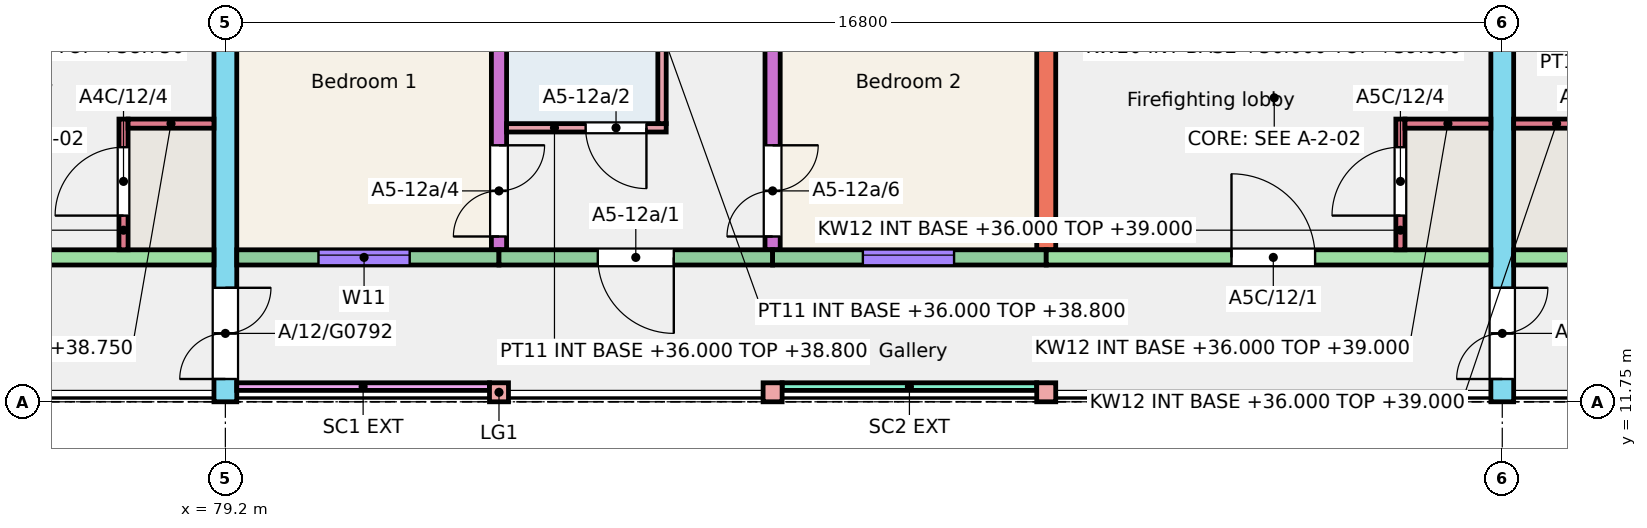
"""IFC4 building model, lengths in metres.
Left out: names, types, materials, properties, quantities, classifications, styles, units other than length and angle.
Written with IfcOpenShell. Run it as: python <this file> out.ifc"""

import sys

from ifc_helpers import new_model, si_unit, direction, frame, frame_2d, origin, origin_2d, place, context, subcontext, project, spatial, rectangle, extrude, element, fill, save


model = new_model("IFC4")
c1 = context("Model", 3, precision=1e-05, world=origin(), true_north=direction((0.0, 1.0)))
c2 = subcontext(c1, "Body", "Model", "MODEL_VIEW")
j1 = project(units=[si_unit("LENGTHUNIT", "METRE"), si_unit("PLANEANGLEUNIT", "RADIAN")], contexts=[c1])
p1 = place(None, origin())
s1 = spatial("IfcSite", under=j1, at=p1, CompositionType="ELEMENT")
p2 = place(p1, origin())
s2 = spatial("IfcBuilding", under=s1, at=p2, CompositionType="ELEMENT")
p3 = place(p2, frame((0.0, 0.0, 36.0)))
s3 = spatial("IfcBuildingStorey", under=s2, at=p3, CompositionType="ELEMENT", Elevation=36.0)
p4 = place(p3, frame((79.2, 11.75, 0.0), z_axis=(0.0, 0.0, 1.0), x_axis=(0.0, 1.0, 0.0)))
e1 = element("IfcWall", 1, at=p4, inside=s3, PredefinedType="SHEAR", context=c2, shape_type="SweptSolid", body=[
    extrude(rectangle(XDim=11.0, YDim=0.3, at=frame_2d((5.5, 0.0))), origin(), (0.0, 0.0, 1.0), 3.0),
])
p5 = place(p4, frame((0.3, 0.0, 0.0)))
e2 = element("IfcOpeningElement", 2, at=p5, cuts=e1, PredefinedType="OPENING", context=c2, shape_type="SweptSolid", body=[
    extrude(rectangle(XDim=1.2, YDim=2.1, at=frame_2d((0.6, 1.05))), frame((0.0, 0.16, 0.0), z_axis=(0.0, -1.0, 0.0), x_axis=(1.0, 0.0, 0.0)), (0.0, 0.0, 1.0), 0.32),
])
p6 = place(p3, frame((82.8, 13.75, 0.0), z_axis=(0.0, 0.0, 1.0), x_axis=(0.0, 1.0, 0.0)))
e3 = element("IfcWall", 3, at=p6, inside=s3, PredefinedType="SHEAR", context=c2, shape_type="SweptSolid", body=[
    extrude(rectangle(XDim=9.0, YDim=0.2, at=frame_2d((4.5, 0.0))), origin(), (0.0, 0.0, 1.0), 3.0),
])
p7 = place(p6, frame((0.175, 0.0, 0.0)))
e4 = element("IfcOpeningElement", 4, at=p7, cuts=e3, PredefinedType="OPENING", context=c2, shape_type="SweptSolid", body=[
    extrude(rectangle(XDim=1.2, YDim=2.1, at=frame_2d((0.6, 1.05))), frame((0.0, 0.11, 0.0), z_axis=(0.0, -1.0, 0.0), x_axis=(1.0, 0.0, 0.0)), (0.0, 0.0, 1.0), 0.22),
])
p8 = place(p6, frame((6.4, 0.0, 0.0)))
e5 = element("IfcOpeningElement", 5, at=p8, cuts=e3, PredefinedType="OPENING", context=c2, shape_type="SweptSolid", body=[
    extrude(rectangle(XDim=1.2, YDim=2.1, at=frame_2d((0.6, 1.05))), frame((0.0, 0.11, 0.0), z_axis=(0.0, -1.0, 0.0), x_axis=(1.0, 0.0, 0.0)), (0.0, 0.0, 1.0), 0.22),
])
p9 = place(p3, frame((86.4, 13.75, 0.0), z_axis=(0.0, 0.0, 1.0), x_axis=(0.0, 1.0, 0.0)))
e6 = element("IfcWall", 6, at=p9, inside=s3, PredefinedType="SHEAR", context=c2, shape_type="SweptSolid", body=[
    extrude(rectangle(XDim=9.0, YDim=0.2, at=frame_2d((4.5, 0.0))), origin(), (0.0, 0.0, 1.0), 3.0),
])
p10 = place(p9, frame((0.175, 0.0, 0.0)))
e7 = element("IfcOpeningElement", 7, at=p10, cuts=e6, PredefinedType="OPENING", context=c2, shape_type="SweptSolid", body=[
    extrude(rectangle(XDim=1.2, YDim=2.1, at=frame_2d((0.6, 1.05))), frame((0.0, 0.11, 0.0), z_axis=(0.0, -1.0, 0.0), x_axis=(1.0, 0.0, 0.0)), (0.0, 0.0, 1.0), 0.22),
])
p11 = place(p9, frame((6.4, 0.0, 0.0)))
e8 = element("IfcOpeningElement", 8, at=p11, cuts=e6, PredefinedType="OPENING", context=c2, shape_type="SweptSolid", body=[
    extrude(rectangle(XDim=1.2, YDim=2.1, at=frame_2d((0.6, 1.05))), frame((0.0, 0.11, 0.0), z_axis=(0.0, -1.0, 0.0), x_axis=(1.0, 0.0, 0.0)), (0.0, 0.0, 1.0), 0.22),
])
p12 = place(p3, frame((90.0, 13.75, 0.0), z_axis=(0.0, 0.0, 1.0), x_axis=(0.0, 1.0, 0.0)))
e9 = element("IfcWall", 9, at=p12, inside=s3, PredefinedType="SHEAR", context=c2, shape_type="SweptSolid", body=[
    extrude(rectangle(XDim=9.0, YDim=0.25, at=frame_2d((4.5, 0.0))), origin(), (0.0, 0.0, 1.0), 3.0),
])
p13 = place(p3, frame((96.0, 11.75, 0.0), z_axis=(0.0, 0.0, 1.0), x_axis=(0.0, 1.0, 0.0)))
e10 = element("IfcWall", 10, at=p13, inside=s3, PredefinedType="SHEAR", context=c2, shape_type="SweptSolid", body=[
    extrude(rectangle(XDim=11.0, YDim=0.3, at=frame_2d((5.5, 0.0))), origin(), (0.0, 0.0, 1.0), 3.0),
])
p14 = place(p13, frame((0.3, 0.0, 0.0)))
e11 = element("IfcOpeningElement", 11, at=p14, cuts=e10, PredefinedType="OPENING", context=c2, shape_type="SweptSolid", body=[
    extrude(rectangle(XDim=1.2, YDim=2.1, at=frame_2d((0.6, 1.05))), frame((0.0, 0.16, 0.0), z_axis=(0.0, -1.0, 0.0), x_axis=(1.0, 0.0, 0.0)), (0.0, 0.0, 1.0), 0.32),
])
p15 = place(p3, frame((73.2, 13.65, 0.0), z_axis=(0.0, 0.0, 1.0), x_axis=(1.0, 0.0, 0.0)))
e12 = element("IfcWall", 12, at=p15, inside=s3, PredefinedType="SHEAR", context=c2, shape_type="SweptSolid", body=[
    extrude(rectangle(XDim=5.85, YDim=0.2, at=frame_2d((2.925, 0.0))), origin(), (0.0, 0.0, 1.0), 2.75),
])
p16 = place(p15, frame((2.438, 0.0, 0.0)))
e13 = element("IfcOpeningElement", 13, at=p16, cuts=e12, PredefinedType="OPENING", context=c2, shape_type="SweptSolid", body=[
    extrude(rectangle(XDim=1.1, YDim=2.1, at=frame_2d((0.55, 1.05))), frame((0.0, 0.11, 0.0), z_axis=(0.0, -1.0, 0.0), x_axis=(1.0, 0.0, 0.0)), (0.0, 0.0, 1.0), 0.22),
])
p17 = place(p3, frame((77.86, 13.75, 0.0), z_axis=(0.0, 0.0, 1.0), x_axis=(0.0, 1.0, 0.0)))
e14 = element("IfcWall", 14, at=p17, inside=s3, PredefinedType="SHEAR", context=c2, shape_type="SweptSolid", body=[
    extrude(rectangle(XDim=1.72, YDim=0.12, at=frame_2d((0.86, 0.0))), origin(), (0.0, 0.0, 1.0), 2.75),
])
p18 = place(p17, frame((0.45, 0.0, 0.0)))
e15 = element("IfcOpeningElement", 15, at=p18, cuts=e14, PredefinedType="OPENING", context=c2, shape_type="SweptSolid", body=[
    extrude(rectangle(XDim=0.9, YDim=2.1, at=frame_2d((0.45, 1.05))), frame((0.0, 0.07, 0.0), z_axis=(0.0, -1.0, 0.0), x_axis=(1.0, 0.0, 0.0)), (0.0, 0.0, 1.0), 0.14),
])
p19 = place(p3, frame((77.92, 15.41, 0.0), z_axis=(0.0, 0.0, 1.0), x_axis=(1.0, 0.0, 0.0)))
e16 = element("IfcWall", 16, at=p19, inside=s3, PredefinedType="SHEAR", context=c2, shape_type="SweptSolid", body=[
    extrude(rectangle(XDim=1.13, YDim=0.12, at=frame_2d((0.565, 0.0))), origin(), (0.0, 0.0, 1.0), 2.75),
])
p20 = place(p3, frame((79.35, 13.65, 0.0), z_axis=(0.0, 0.0, 1.0), x_axis=(1.0, 0.0, 0.0)))
e17 = element("IfcWall", 17, at=p20, inside=s3, PredefinedType="SOLIDWALL", context=c2, shape_type="SweptSolid", body=[
    extrude(rectangle(XDim=3.45, YDim=0.2, at=frame_2d((1.725, 0.0))), origin(), (0.0, 0.0, 1.0), 3.0),
])
p21 = place(p20, frame((1.075, 0.0, 0.8)))
e18 = element("IfcOpeningElement", 18, at=p21, cuts=e17, PredefinedType="OPENING", context=c2, shape_type="SweptSolid", body=[
    extrude(rectangle(XDim=1.2, YDim=1.6, at=frame_2d((0.6, 0.8))), frame((0.0, 0.11, 0.0), z_axis=(0.0, -1.0, 0.0), x_axis=(1.0, 0.0, 0.0)), (0.0, 0.0, 1.0), 0.22),
])
p22 = place(p3, frame((82.8, 13.65, 0.0), z_axis=(0.0, 0.0, 1.0), x_axis=(1.0, 0.0, 0.0)))
e19 = element("IfcWall", 19, at=p22, inside=s3, PredefinedType="SOLIDWALL", context=c2, shape_type="SweptSolid", body=[
    extrude(rectangle(XDim=3.6, YDim=0.2, at=frame_2d((1.8, 0.0))), origin(), (0.0, 0.0, 1.0), 3.0),
])
p23 = place(p22, frame((1.3, 0.0, 0.0)))
e20 = element("IfcOpeningElement", 20, at=p23, cuts=e19, PredefinedType="OPENING", context=c2, shape_type="SweptSolid", body=[
    extrude(rectangle(XDim=1.0, YDim=2.1, at=frame_2d((0.5, 1.05))), frame((0.0, 0.11, 0.0), z_axis=(0.0, -1.0, 0.0), x_axis=(1.0, 0.0, 0.0)), (0.0, 0.0, 1.0), 0.22),
])
p24 = place(p3, frame((86.4, 13.65, 0.0), z_axis=(0.0, 0.0, 1.0), x_axis=(1.0, 0.0, 0.0)))
e21 = element("IfcWall", 21, at=p24, inside=s3, PredefinedType="SOLIDWALL", context=c2, shape_type="SweptSolid", body=[
    extrude(rectangle(XDim=3.6, YDim=0.2, at=frame_2d((1.8, 0.0))), origin(), (0.0, 0.0, 1.0), 3.0),
])
p25 = place(p24, frame((1.188, 0.0, 0.8)))
e22 = element("IfcOpeningElement", 22, at=p25, cuts=e21, PredefinedType="OPENING", context=c2, shape_type="SweptSolid", body=[
    extrude(rectangle(XDim=1.2, YDim=1.6, at=frame_2d((0.6, 0.8))), frame((0.0, 0.11, 0.0), z_axis=(0.0, -1.0, 0.0), x_axis=(1.0, 0.0, 0.0)), (0.0, 0.0, 1.0), 0.22),
])
p26 = place(p3, frame((90.0, 13.65, 0.0), z_axis=(0.0, 0.0, 1.0), x_axis=(1.0, 0.0, 0.0)))
e23 = element("IfcWall", 23, at=p26, inside=s3, PredefinedType="SHEAR", context=c2, shape_type="SweptSolid", body=[
    extrude(rectangle(XDim=5.85, YDim=0.2, at=frame_2d((2.925, 0.0))), origin(), (0.0, 0.0, 1.0), 3.0),
])
p27 = place(p26, frame((2.438, 0.0, 0.0)))
e24 = element("IfcOpeningElement", 24, at=p27, cuts=e23, PredefinedType="OPENING", context=c2, shape_type="SweptSolid", body=[
    extrude(rectangle(XDim=1.1, YDim=2.1, at=frame_2d((0.55, 1.05))), frame((0.0, 0.11, 0.0), z_axis=(0.0, -1.0, 0.0), x_axis=(1.0, 0.0, 0.0)), (0.0, 0.0, 1.0), 0.22),
])
p28 = place(p3, frame((94.66, 13.75, 0.0), z_axis=(0.0, 0.0, 1.0), x_axis=(0.0, 1.0, 0.0)))
e25 = element("IfcWall", 25, at=p28, inside=s3, PredefinedType="SHEAR", context=c2, shape_type="SweptSolid", body=[
    extrude(rectangle(XDim=1.72, YDim=0.12, at=frame_2d((0.86, 0.0))), origin(), (0.0, 0.0, 1.0), 3.0),
])
p29 = place(p28, frame((0.45, 0.0, 0.0)))
e26 = element("IfcOpeningElement", 26, at=p29, cuts=e25, PredefinedType="OPENING", context=c2, shape_type="SweptSolid", body=[
    extrude(rectangle(XDim=0.9, YDim=2.1, at=frame_2d((0.45, 1.05))), frame((0.0, 0.07, 0.0), z_axis=(0.0, -1.0, 0.0), x_axis=(1.0, 0.0, 0.0)), (0.0, 0.0, 1.0), 0.14),
])
p30 = place(p3, frame((94.72, 15.41, 0.0), z_axis=(0.0, 0.0, 1.0), x_axis=(1.0, 0.0, 0.0)))
e27 = element("IfcWall", 27, at=p30, inside=s3, PredefinedType="SHEAR", context=c2, shape_type="SweptSolid", body=[
    extrude(rectangle(XDim=1.13, YDim=0.12, at=frame_2d((0.565, 0.0))), origin(), (0.0, 0.0, 1.0), 3.0),
])
p31 = place(p3, frame((96.15, 13.65, 0.0), z_axis=(0.0, 0.0, 1.0), x_axis=(1.0, 0.0, 0.0)))
e28 = element("IfcWall", 28, at=p31, inside=s3, PredefinedType="SHEAR", context=c2, shape_type="SweptSolid", body=[
    extrude(rectangle(XDim=5.85, YDim=0.2, at=frame_2d((2.925, 0.0))), origin(), (0.0, 0.0, 1.0), 3.0),
])
p32 = place(p31, frame((2.312, 0.0, 0.0)))
e29 = element("IfcOpeningElement", 29, at=p32, cuts=e28, PredefinedType="OPENING", context=c2, shape_type="SweptSolid", body=[
    extrude(rectangle(XDim=1.1, YDim=2.1, at=frame_2d((0.55, 1.05))), frame((0.0, 0.11, 0.0), z_axis=(0.0, -1.0, 0.0), x_axis=(1.0, 0.0, 0.0)), (0.0, 0.0, 1.0), 0.22),
])
p33 = place(p3, frame((96.15, 15.41, 0.0), z_axis=(0.0, 0.0, 1.0), x_axis=(1.0, 0.0, 0.0)))
e30 = element("IfcWall", 30, at=p33, inside=s3, PredefinedType="SHEAR", context=c2, shape_type="SweptSolid", body=[
    extrude(rectangle(XDim=1.13, YDim=0.12, at=frame_2d((0.565, 0.0))), origin(), (0.0, 0.0, 1.0), 3.0),
])
for number, where, z_axis, x_axis in (
    (31, (82.8, 11.875, 0.0), (0.0, 0.0, 1.0), (1.0, 0.0, 0.0)),
    (32, (86.4, 11.875, 0.0), (0.0, 0.0, 1.0), (1.0, 0.0, 0.0)),
    (33, (90.0, 11.875, 0.0), (0.0, 0.0, 1.0), (1.0, 0.0, 0.0)),
):
    element("IfcColumn", number, at=place(p3, frame(where, z_axis=z_axis, x_axis=x_axis)), inside=s3, PredefinedType="COLUMN", context=c2, shape_type="SweptSolid", body=[
        extrude(rectangle(XDim=0.25, YDim=0.25, at=origin_2d()), origin(), (0.0, 0.0, 1.0), 3.0),
    ])
p34 = place(p3, frame((79.35, 11.95, 0.0), z_axis=(0.0, 0.0, 1.0), x_axis=(1.0, 0.0, 0.0)))
e34 = element("IfcWall", 34, at=p34, inside=s3, PredefinedType="SOLIDWALL", context=c2, shape_type="SweptSolid", body=[
    extrude(rectangle(XDim=3.325, YDim=0.1, at=frame_2d((1.663, 0.0))), origin(), (0.0, 0.0, 1.0), 2.45),
])
p35 = place(p3, frame((86.525, 11.95, 0.0), z_axis=(0.0, 0.0, 1.0), x_axis=(1.0, 0.0, 0.0)))
e35 = element("IfcWall", 35, at=p35, inside=s3, PredefinedType="SOLIDWALL", context=c2, shape_type="SweptSolid", body=[
    extrude(rectangle(XDim=3.35, YDim=0.1, at=frame_2d((1.675, 0.0))), origin(), (0.0, 0.0, 1.0), 2.45),
])
p36 = place(p3, frame((82.9, 15.355, 0.0), z_axis=(0.0, 0.0, 1.0), x_axis=(1.0, 0.0, 0.0)))
e36 = element("IfcWall", 36, at=p36, inside=s3, PredefinedType="PARTITIONING", context=c2, shape_type="SweptSolid", body=[
    extrude(rectangle(XDim=2.1, YDim=0.11, at=frame_2d((1.05, 0.0))), origin(), (0.0, 0.0, 1.0), 2.8),
])
p37 = place(p36, frame((1.04, 0.0, 0.0)))
e37 = element("IfcOpeningElement", 37, at=p37, cuts=e36, PredefinedType="OPENING", context=c2, shape_type="SweptSolid", body=[
    extrude(rectangle(XDim=0.8, YDim=2.1, at=frame_2d((0.4, 1.05))), frame((0.0, 0.065, 0.0), z_axis=(0.0, -1.0, 0.0), x_axis=(1.0, 0.0, 0.0)), (0.0, 0.0, 1.0), 0.13),
])
p38 = place(p3, frame((84.945, 15.41, 0.0), z_axis=(0.0, 0.0, 1.0), x_axis=(0.0, 1.0, 0.0)))
e38 = element("IfcWall", 38, at=p38, inside=s3, PredefinedType="PARTITIONING", context=c2, shape_type="SweptSolid", body=[
    extrude(rectangle(XDim=2.4, YDim=0.11, at=frame_2d((1.2, 0.0))), origin(), (0.0, 0.0, 1.0), 2.8),
])
p39 = place(p21, origin())
e39 = element("IfcWindow", 39, at=p39, inside=s3, PartitioningType="SINGLE_PANEL", PredefinedType="WINDOW", context=c2, shape_type="SweptSolid", body=[
    extrude(rectangle(XDim=1.2, YDim=1.6, at=frame_2d((0.6, 0.8))), frame((0.0, 0.06, 0.0), z_axis=(0.0, -1.0, 0.0), x_axis=(1.0, 0.0, 0.0)), (0.0, 0.0, 1.0), 0.06),
])
fill(e18, e39)
p40 = place(p25, origin())
e40 = element("IfcWindow", 40, at=p40, inside=s3, PartitioningType="SINGLE_PANEL", PredefinedType="WINDOW", context=c2, shape_type="SweptSolid", body=[
    extrude(rectangle(XDim=1.2, YDim=1.6, at=frame_2d((0.6, 0.8))), frame((0.0, 0.06, 0.0), z_axis=(0.0, -1.0, 0.0), x_axis=(1.0, 0.0, 0.0)), (0.0, 0.0, 1.0), 0.06),
])
fill(e22, e40)
p41 = place(p23, origin())
e41 = element("IfcDoor", 41, at=p41, inside=s3, OperationType="SINGLE_SWING_RIGHT", PredefinedType="DOOR", context=c2, shape_type="SweptSolid", body=[
    extrude(rectangle(XDim=1.0, YDim=2.1, at=frame_2d((0.5, 1.05))), frame((0.0, 0.025, 0.0), z_axis=(0.0, -1.0, 0.0), x_axis=(1.0, 0.0, 0.0)), (0.0, 0.0, 1.0), 0.05),
])
fill(e20, e41)
p42 = place(p37, origin())
e42 = element("IfcDoor", 42, at=p42, inside=s3, OperationType="SINGLE_SWING_RIGHT", PredefinedType="DOOR", context=c2, shape_type="SweptSolid", body=[
    extrude(rectangle(XDim=0.8, YDim=2.1, at=frame_2d((0.4, 1.05))), frame((0.0, 0.025, 0.0), z_axis=(0.0, -1.0, 0.0), x_axis=(1.0, 0.0, 0.0)), (0.0, 0.0, 1.0), 0.05),
])
fill(e37, e42)
p43 = place(p7, origin())
e43 = element("IfcDoor", 43, at=p43, inside=s3, OperationType="DOUBLE_DOOR_SINGLE_SWING", PredefinedType="DOOR", context=c2, shape_type="SweptSolid", body=[
    extrude(rectangle(XDim=1.2, YDim=2.1, at=frame_2d((0.6, 1.05))), frame((0.0, 0.025, 0.0), z_axis=(0.0, -1.0, 0.0), x_axis=(1.0, 0.0, 0.0)), (0.0, 0.0, 1.0), 0.05),
])
fill(e4, e43)
p44 = place(p10, origin())
e44 = element("IfcDoor", 44, at=p44, inside=s3, OperationType="DOUBLE_DOOR_SINGLE_SWING", PredefinedType="DOOR", context=c2, shape_type="SweptSolid", body=[
    extrude(rectangle(XDim=1.2, YDim=2.1, at=frame_2d((0.6, 1.05))), frame((0.0, 0.025, 0.0), z_axis=(0.0, -1.0, 0.0), x_axis=(1.0, 0.0, 0.0)), (0.0, 0.0, 1.0), 0.05),
])
fill(e7, e44)
p45 = place(p18, origin())
e45 = element("IfcDoor", 45, at=p45, inside=s3, OperationType="SINGLE_SWING_LEFT", PredefinedType="DOOR", context=c2, shape_type="SweptSolid", body=[
    extrude(rectangle(XDim=0.9, YDim=2.1, at=frame_2d((0.45, 1.05))), frame((0.0, 0.025, 0.0), z_axis=(0.0, -1.0, 0.0), x_axis=(1.0, 0.0, 0.0)), (0.0, 0.0, 1.0), 0.05),
])
fill(e15, e45)
p46 = place(p27, origin())
e46 = element("IfcDoor", 46, at=p46, inside=s3, OperationType="SINGLE_SWING_LEFT", PredefinedType="DOOR", context=c2, shape_type="SweptSolid", body=[
    extrude(rectangle(XDim=1.1, YDim=2.1, at=frame_2d((0.55, 1.05))), frame((0.0, 0.025, 0.0), z_axis=(0.0, -1.0, 0.0), x_axis=(1.0, 0.0, 0.0)), (0.0, 0.0, 1.0), 0.05),
])
fill(e24, e46)
p47 = place(p29, origin())
e47 = element("IfcDoor", 47, at=p47, inside=s3, OperationType="SINGLE_SWING_LEFT", PredefinedType="DOOR", context=c2, shape_type="SweptSolid", body=[
    extrude(rectangle(XDim=0.9, YDim=2.1, at=frame_2d((0.45, 1.05))), frame((0.0, 0.025, 0.0), z_axis=(0.0, -1.0, 0.0), x_axis=(1.0, 0.0, 0.0)), (0.0, 0.0, 1.0), 0.05),
])
fill(e26, e47)
p48 = place(p5, origin())
e48 = element("IfcDoor", 48, at=p48, inside=s3, OperationType="DOUBLE_DOOR_SINGLE_SWING", PredefinedType="DOOR", context=c2, shape_type="SweptSolid", body=[
    extrude(rectangle(XDim=1.2, YDim=2.1, at=frame_2d((0.6, 1.05))), frame((0.0, 0.025, 0.0), z_axis=(0.0, -1.0, 0.0), x_axis=(1.0, 0.0, 0.0)), (0.0, 0.0, 1.0), 0.05),
])
fill(e2, e48)
p49 = place(p14, origin())
e49 = element("IfcDoor", 49, at=p49, inside=s3, OperationType="DOUBLE_DOOR_SINGLE_SWING", PredefinedType="DOOR", context=c2, shape_type="SweptSolid", body=[
    extrude(rectangle(XDim=1.2, YDim=2.1, at=frame_2d((0.6, 1.05))), frame((0.0, 0.025, 0.0), z_axis=(0.0, -1.0, 0.0), x_axis=(1.0, 0.0, 0.0)), (0.0, 0.0, 1.0), 0.05),
])
fill(e11, e49)
save(model, sys.argv[1])
